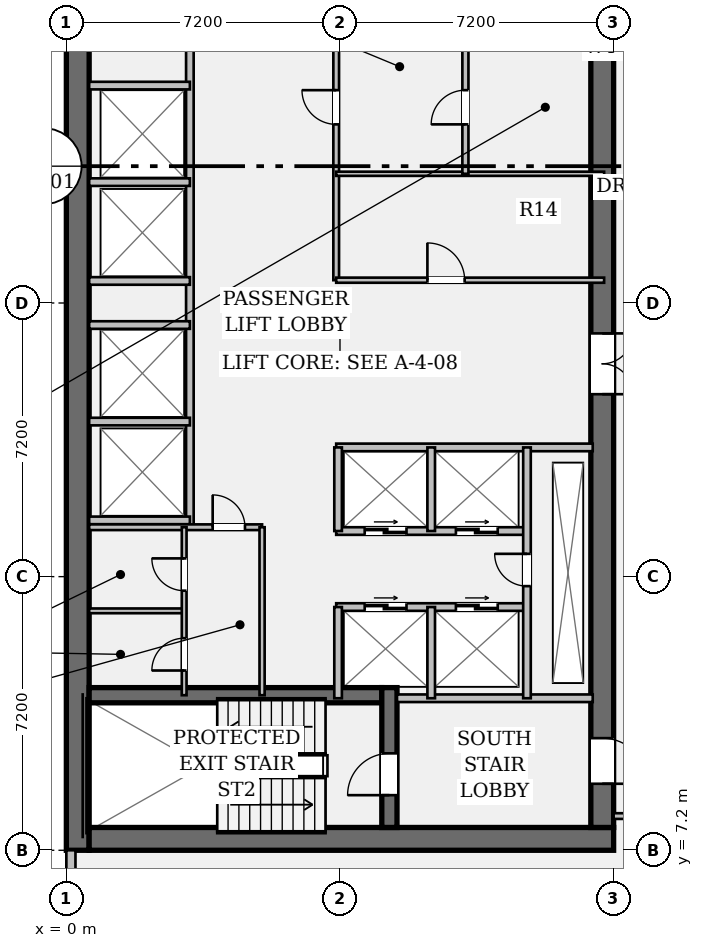
"""IFC4 building model, lengths in metres.
Left out: names, types, materials, properties, quantities, classifications, styles, units other than length and angle.
Written with IfcOpenShell. Run it as: python <this file> out.ifc"""

import sys

from ifc_helpers import new_model, si_unit, direction, frame, frame_2d, origin, place, context, subcontext, project, spatial, rectangle, extrude, element, fill, save


model = new_model("IFC4")
c1 = context("Model", 3, precision=1e-05, world=origin(), true_north=direction((0.0, 1.0)))
c2 = subcontext(c1, "Body", "Model", "MODEL_VIEW")
j1 = project(units=[si_unit("LENGTHUNIT", "METRE"), si_unit("PLANEANGLEUNIT", "RADIAN")], contexts=[c1])
p1 = place(None, origin())
s1 = spatial("IfcSite", under=j1, at=p1, CompositionType="ELEMENT")
p2 = place(p1, origin())
s2 = spatial("IfcBuilding", under=s1, at=p2, CompositionType="ELEMENT")
p3 = place(p2, frame((0.0, 0.0, 129.15)))
s3 = spatial("IfcBuildingStorey", under=s2, at=p3, CompositionType="ELEMENT", Elevation=129.15)
p4 = place(p3, frame((0.3, 7.2, 0.0), z_axis=(0.0, 0.0, 1.0), x_axis=(0.0, 1.0, 0.0)))
e1 = element("IfcWall", 1, at=p4, inside=s3, PredefinedType="SHEAR", context=c2, shape_type="SweptSolid", body=[
    extrude(rectangle(XDim=28.8, YDim=0.6, at=frame_2d((14.4, 0.0))), origin(), (0.0, 0.0, 1.0), 3.58),
])
p5 = place(p3, frame((0.6, 7.5, 0.0), z_axis=(0.0, 0.0, 1.0), x_axis=(1.0, 0.0, 0.0)))
e2 = element("IfcWall", 2, at=p5, inside=s3, PredefinedType="SHEAR", context=c2, shape_type="SweptSolid", body=[
    extrude(rectangle(XDim=13.8, YDim=0.6, at=frame_2d((6.9, 0.0))), origin(), (0.0, 0.0, 1.0), 3.58),
])
p6 = place(p3, frame((14.1, 35.4, 0.0), z_axis=(0.0, 0.0, 1.0), x_axis=(0.0, -1.0, 0.0)))
e3 = element("IfcWall", 3, at=p6, inside=s3, PredefinedType="SHEAR", context=c2, shape_type="SweptSolid", body=[
    extrude(rectangle(XDim=27.6, YDim=0.6, at=frame_2d((13.8, 0.0))), origin(), (0.0, 0.0, 1.0), 3.58),
])
p7 = place(p6, frame((1.3, 0.0, 0.0)))
e4 = element("IfcOpeningElement", 4, at=p7, cuts=e3, PredefinedType="OPENING", context=c2, shape_type="SweptSolid", body=[
    extrude(rectangle(XDim=1.2, YDim=2.15, at=frame_2d((0.6, 1.075))), frame((0.0, 0.312, 0.0), z_axis=(0.0, -1.0, 0.0), x_axis=(1.0, 0.0, 0.0)), (0.0, 0.0, 1.0), 0.624),
])
p8 = place(p6, frame((25.25, 0.0, 0.0)))
e5 = element("IfcOpeningElement", 5, at=p8, cuts=e3, PredefinedType="OPENING", context=c2, shape_type="SweptSolid", body=[
    extrude(rectangle(XDim=1.2, YDim=2.15, at=frame_2d((0.6, 1.075))), frame((0.0, 0.312, 0.0), z_axis=(0.0, -1.0, 0.0), x_axis=(1.0, 0.0, 0.0)), (0.0, 0.0, 1.0), 0.624),
])
p9 = place(p6, frame((14.6, 0.0, 0.0)))
e6 = element("IfcOpeningElement", 6, at=p9, cuts=e3, PredefinedType="OPENING", context=c2, shape_type="SweptSolid", body=[
    extrude(rectangle(XDim=1.6, YDim=2.2, at=frame_2d((0.8, 1.1))), frame((0.0, 0.312, 0.0), z_axis=(0.0, -1.0, 0.0), x_axis=(1.0, 0.0, 0.0)), (0.0, 0.0, 1.0), 0.624),
])
p10 = place(p3, frame((0.6, 11.28, 0.0), z_axis=(0.0, 0.0, 1.0), x_axis=(1.0, 0.0, 0.0)))
e7 = element("IfcWall", 7, at=p10, inside=s3, PredefinedType="SHEAR", context=c2, shape_type="SweptSolid", body=[
    extrude(rectangle(XDim=7.7, YDim=0.4, at=frame_2d((3.85, 0.0))), origin(), (0.0, 0.0, 1.0), 3.58),
])
p11 = place(p3, frame((8.5, 7.8, 0.0), z_axis=(0.0, 0.0, 1.0), x_axis=(0.0, 1.0, 0.0)))
e8 = element("IfcWall", 8, at=p11, inside=s3, PredefinedType="SHEAR", context=c2, shape_type="SweptSolid", body=[
    extrude(rectangle(XDim=3.68, YDim=0.4, at=frame_2d((1.84, 0.0))), origin(), (0.0, 0.0, 1.0), 3.58),
])
p12 = place(p11, frame((0.85, 0.0, 0.0)))
e9 = element("IfcOpeningElement", 9, at=p12, cuts=e8, PredefinedType="OPENING", context=c2, shape_type="SweptSolid", body=[
    extrude(rectangle(XDim=1.1, YDim=2.15, at=frame_2d((0.55, 1.075))), frame((0.0, 0.212, 0.0), z_axis=(0.0, -1.0, 0.0), x_axis=(1.0, 0.0, 0.0)), (0.0, 0.0, 1.0), 0.424),
])
p13 = place(p3, frame((0.12, 5.87, 0.0), z_axis=(0.0, 0.0, 1.0), x_axis=(0.0, 1.0, 0.0)))
e10 = element("IfcWall", 10, at=p13, inside=s3, PredefinedType="STANDARD", context=c2, shape_type="SweptSolid", body=[
    extrude(rectangle(XDim=1.33, YDim=0.24, at=frame_2d((0.665, 0.0))), origin(), (0.0, 0.0, 1.0), 3.58),
])
p14 = place(p3, frame((8.7, 11.2, 0.0), z_axis=(0.0, 0.0, 1.0), x_axis=(1.0, 0.0, 0.0)))
e11 = element("IfcWall", 11, at=p14, inside=s3, PredefinedType="PARTITIONING", context=c2, shape_type="SweptSolid", body=[
    extrude(rectangle(XDim=5.15, YDim=0.2, at=frame_2d((2.575, 0.0))), origin(), (0.0, 0.0, 1.0), 3.58),
])
p15 = place(p3, frame((3.25, 15.7, 0.0), z_axis=(0.0, 0.0, 1.0), x_axis=(0.0, 1.0, 0.0)))
e12 = element("IfcWall", 12, at=p15, inside=s3, PredefinedType="PARTITIONING", context=c2, shape_type="SweptSolid", body=[
    extrude(rectangle(XDim=13.08, YDim=0.2, at=frame_2d((6.54, 0.0))), origin(), (0.0, 0.0, 1.0), 3.58),
])
for number, where, z_axis, x_axis in (
    (13, (0.6, 15.88, 0.0), (0.0, 0.0, 1.0), (1.0, 0.0, 0.0)),
    (14, (0.6, 18.48, 0.0), (0.0, 0.0, 1.0), (1.0, 0.0, 0.0)),
    (15, (0.6, 22.18, 0.0), (0.0, 0.0, 1.0), (1.0, 0.0, 0.0)),
    (16, (0.6, 24.78, 0.0), (0.0, 0.0, 1.0), (1.0, 0.0, 0.0)),
    (17, (0.6, 21.02, 0.0), (0.0, 0.0, 1.0), (1.0, 0.0, 0.0)),
    (18, (0.6, 27.32, 0.0), (0.0, 0.0, 1.0), (1.0, 0.0, 0.0)),
):
    element("IfcWall", number, at=place(p3, frame(where, z_axis=z_axis, x_axis=x_axis)), inside=s3, PredefinedType="PARTITIONING", context=c2, shape_type="SweptSolid", body=[
        extrude(rectangle(XDim=2.65, YDim=0.2, at=frame_2d((1.325, 0.0))), origin(), (0.0, 0.0, 1.0), 3.58),
    ])
p16 = place(p3, frame((7.1, 22.2, 0.0), z_axis=(0.0, 0.0, 1.0), x_axis=(0.0, 1.0, 0.0)))
e19 = element("IfcWall", 19, at=p16, inside=s3, PredefinedType="PARTITIONING", context=c2, shape_type="SweptSolid", body=[
    extrude(rectangle(XDim=6.58, YDim=0.15, at=frame_2d((3.29, 0.0))), origin(), (0.0, 0.0, 1.0), 3.58),
])
p17 = place(p16, frame((4.1, 0.0, 0.0)))
e20 = element("IfcOpeningElement", 20, at=p17, cuts=e19, PredefinedType="OPENING", context=c2, shape_type="SweptSolid", body=[
    extrude(rectangle(XDim=0.9, YDim=2.15, at=frame_2d((0.45, 1.075))), frame((0.0, 0.087, 0.0), z_axis=(0.0, -1.0, 0.0), x_axis=(1.0, 0.0, 0.0)), (0.0, 0.0, 1.0), 0.174),
])
p18 = place(p3, frame((7.1, 22.2, 0.0), z_axis=(0.0, 0.0, 1.0), x_axis=(1.0, 0.0, 0.0)))
e21 = element("IfcWall", 21, at=p18, inside=s3, PredefinedType="PARTITIONING", context=c2, shape_type="SweptSolid", body=[
    extrude(rectangle(XDim=7.05, YDim=0.135, at=frame_2d((3.525, 0.0))), origin(), (0.0, 0.0, 1.0), 3.58),
])
p19 = place(p18, frame((2.4, 0.0, 0.0)))
e22 = element("IfcOpeningElement", 22, at=p19, cuts=e21, PredefinedType="OPENING", context=c2, shape_type="SweptSolid", body=[
    extrude(rectangle(XDim=0.98, YDim=2.15, at=frame_2d((0.49, 1.075))), frame((0.0, 0.08, 0.0), z_axis=(0.0, -1.0, 0.0), x_axis=(1.0, 0.0, 0.0)), (0.0, 0.0, 1.0), 0.159),
])
p20 = place(p3, frame((7.1, 25.0, 0.0), z_axis=(0.0, 0.0, 1.0), x_axis=(1.0, 0.0, 0.0)))
e23 = element("IfcWall", 23, at=p20, inside=s3, PredefinedType="PARTITIONING", context=c2, shape_type="SweptSolid", body=[
    extrude(rectangle(XDim=7.05, YDim=0.11, at=frame_2d((3.525, 0.0))), origin(), (0.0, 0.0, 1.0), 3.58),
])
p21 = place(p3, frame((10.5, 25.0, 0.0), z_axis=(0.0, 0.0, 1.0), x_axis=(0.0, 1.0, 0.0)))
e24 = element("IfcWall", 24, at=p21, inside=s3, PredefinedType="PARTITIONING", context=c2, shape_type="SweptSolid", body=[
    extrude(rectangle(XDim=3.78, YDim=0.16, at=frame_2d((1.89, 0.0))), origin(), (0.0, 0.0, 1.0), 3.58),
])
p22 = place(p21, frame((1.3, 0.0, 0.0)))
e25 = element("IfcOpeningElement", 25, at=p22, cuts=e24, PredefinedType="OPENING", context=c2, shape_type="SweptSolid", body=[
    extrude(rectangle(XDim=0.9, YDim=2.15, at=frame_2d((0.45, 1.075))), frame((0.0, 0.092, 0.0), z_axis=(0.0, -1.0, 0.0), x_axis=(1.0, 0.0, 0.0)), (0.0, 0.0, 1.0), 0.184),
])
p23 = place(p3, frame((7.1, 17.8, 0.0), z_axis=(0.0, 0.0, 1.0), x_axis=(1.0, 0.0, 0.0)))
e26 = element("IfcWall", 26, at=p23, inside=s3, PredefinedType="PARTITIONING", context=c2, shape_type="SweptSolid", body=[
    extrude(rectangle(XDim=6.75, YDim=0.2, at=frame_2d((3.375, 0.0))), origin(), (0.0, 0.0, 1.0), 3.58),
])
p24 = place(p3, frame((7.1, 15.6, 0.0), z_axis=(0.0, 0.0, 1.0), x_axis=(1.0, 0.0, 0.0)))
e27 = element("IfcWall", 27, at=p24, inside=s3, PredefinedType="PARTITIONING", context=c2, shape_type="SweptSolid", body=[
    extrude(rectangle(XDim=5.02, YDim=0.2, at=frame_2d((2.51, 0.0))), origin(), (0.0, 0.0, 1.0), 3.58),
])
p25 = place(p24, frame((0.75, 0.0, 0.0)))
e28 = element("IfcOpeningElement", 28, at=p25, cuts=e27, PredefinedType="OPENING", context=c2, shape_type="SweptSolid", body=[
    extrude(rectangle(XDim=1.1, YDim=2.2, at=frame_2d((0.55, 1.1))), frame((0.0, 0.112, 0.0), z_axis=(0.0, -1.0, 0.0), x_axis=(1.0, 0.0, 0.0)), (0.0, 0.0, 1.0), 0.224),
])
p26 = place(p24, frame((3.15, 0.0, 0.0)))
e29 = element("IfcOpeningElement", 29, at=p26, cuts=e27, PredefinedType="OPENING", context=c2, shape_type="SweptSolid", body=[
    extrude(rectangle(XDim=1.1, YDim=2.2, at=frame_2d((0.55, 1.1))), frame((0.0, 0.112, 0.0), z_axis=(0.0, -1.0, 0.0), x_axis=(1.0, 0.0, 0.0)), (0.0, 0.0, 1.0), 0.224),
])
p27 = place(p3, frame((7.1, 13.6, 0.0), z_axis=(0.0, 0.0, 1.0), x_axis=(1.0, 0.0, 0.0)))
e30 = element("IfcWall", 30, at=p27, inside=s3, PredefinedType="PARTITIONING", context=c2, shape_type="SweptSolid", body=[
    extrude(rectangle(XDim=5.02, YDim=0.2, at=frame_2d((2.51, 0.0))), origin(), (0.0, 0.0, 1.0), 3.58),
])
p28 = place(p27, frame((0.75, 0.0, 0.0)))
e31 = element("IfcOpeningElement", 31, at=p28, cuts=e30, PredefinedType="OPENING", context=c2, shape_type="SweptSolid", body=[
    extrude(rectangle(XDim=1.1, YDim=2.2, at=frame_2d((0.55, 1.1))), frame((0.0, 0.112, 0.0), z_axis=(0.0, -1.0, 0.0), x_axis=(1.0, 0.0, 0.0)), (0.0, 0.0, 1.0), 0.224),
])
p29 = place(p27, frame((3.15, 0.0, 0.0)))
e32 = element("IfcOpeningElement", 32, at=p29, cuts=e30, PredefinedType="OPENING", context=c2, shape_type="SweptSolid", body=[
    extrude(rectangle(XDim=1.1, YDim=2.2, at=frame_2d((0.55, 1.1))), frame((0.0, 0.112, 0.0), z_axis=(0.0, -1.0, 0.0), x_axis=(1.0, 0.0, 0.0)), (0.0, 0.0, 1.0), 0.224),
])
p30 = place(p3, frame((7.15, 15.6, 0.0), z_axis=(0.0, 0.0, 1.0), x_axis=(0.0, 1.0, 0.0)))
e33 = element("IfcWall", 33, at=p30, inside=s3, PredefinedType="PARTITIONING", context=c2, shape_type="SweptSolid", body=[
    extrude(rectangle(XDim=2.2, YDim=0.2, at=frame_2d((1.1, 0.0))), origin(), (0.0, 0.0, 1.0), 3.58),
])
p31 = place(p3, frame((7.15, 11.2, 0.0), z_axis=(0.0, 0.0, 1.0), x_axis=(0.0, 1.0, 0.0)))
e34 = element("IfcWall", 34, at=p31, inside=s3, PredefinedType="PARTITIONING", context=c2, shape_type="SweptSolid", body=[
    extrude(rectangle(XDim=2.4, YDim=0.2, at=frame_2d((1.2, 0.0))), origin(), (0.0, 0.0, 1.0), 3.58),
])
p32 = place(p3, frame((9.6, 15.6, 0.0), z_axis=(0.0, 0.0, 1.0), x_axis=(0.0, 1.0, 0.0)))
e35 = element("IfcWall", 35, at=p32, inside=s3, PredefinedType="PARTITIONING", context=c2, shape_type="SweptSolid", body=[
    extrude(rectangle(XDim=2.2, YDim=0.2, at=frame_2d((1.1, 0.0))), origin(), (0.0, 0.0, 1.0), 3.58),
])
p33 = place(p3, frame((9.6, 11.2, 0.0), z_axis=(0.0, 0.0, 1.0), x_axis=(0.0, 1.0, 0.0)))
e36 = element("IfcWall", 36, at=p33, inside=s3, PredefinedType="PARTITIONING", context=c2, shape_type="SweptSolid", body=[
    extrude(rectangle(XDim=2.4, YDim=0.2, at=frame_2d((1.2, 0.0))), origin(), (0.0, 0.0, 1.0), 3.58),
])
p34 = place(p3, frame((12.12, 11.2, 0.0), z_axis=(0.0, 0.0, 1.0), x_axis=(0.0, 1.0, 0.0)))
e37 = element("IfcWall", 37, at=p34, inside=s3, PredefinedType="PARTITIONING", context=c2, shape_type="SweptSolid", body=[
    extrude(rectangle(XDim=6.6, YDim=0.2, at=frame_2d((3.3, 0.0))), origin(), (0.0, 0.0, 1.0), 3.58),
])
p35 = place(p34, frame((2.95, 0.0, 0.0)))
e38 = element("IfcOpeningElement", 38, at=p35, cuts=e37, PredefinedType="OPENING", context=c2, shape_type="SweptSolid", body=[
    extrude(rectangle(XDim=0.85, YDim=2.15, at=frame_2d((0.425, 1.075))), frame((0.0, 0.112, 0.0), z_axis=(0.0, -1.0, 0.0), x_axis=(1.0, 0.0, 0.0)), (0.0, 0.0, 1.0), 0.224),
])
p36 = place(p3, frame((0.6, 15.7, 0.0), z_axis=(0.0, 0.0, 1.0), x_axis=(1.0, 0.0, 0.0)))
e39 = element("IfcWall", 39, at=p36, inside=s3, PredefinedType="PARTITIONING", context=c2, shape_type="SweptSolid", body=[
    extrude(rectangle(XDim=4.55, YDim=0.15, at=frame_2d((2.275, 0.0))), origin(), (0.0, 0.0, 1.0), 3.58),
])
p37 = place(p36, frame((3.25, 0.0, 0.0)))
e40 = element("IfcOpeningElement", 40, at=p37, cuts=e39, PredefinedType="OPENING", context=c2, shape_type="SweptSolid", body=[
    extrude(rectangle(XDim=0.85, YDim=2.15, at=frame_2d((0.425, 1.075))), frame((0.0, 0.087, 0.0), z_axis=(0.0, -1.0, 0.0), x_axis=(1.0, 0.0, 0.0)), (0.0, 0.0, 1.0), 0.174),
])
p38 = place(p3, frame((5.15, 11.28, 0.0), z_axis=(0.0, 0.0, 1.0), x_axis=(0.0, 1.0, 0.0)))
e41 = element("IfcWall", 41, at=p38, inside=s3, PredefinedType="PARTITIONING", context=c2, shape_type="SweptSolid", body=[
    extrude(rectangle(XDim=4.42, YDim=0.135, at=frame_2d((2.21, 0.0))), origin(), (0.0, 0.0, 1.0), 3.58),
])
p39 = place(p3, frame((0.6, 13.5, 0.0), z_axis=(0.0, 0.0, 1.0), x_axis=(1.0, 0.0, 0.0)))
e42 = element("IfcWall", 42, at=p39, inside=s3, PredefinedType="PARTITIONING", context=c2, shape_type="SweptSolid", body=[
    extrude(rectangle(XDim=2.5, YDim=0.125, at=frame_2d((1.25, 0.0))), origin(), (0.0, 0.0, 1.0), 3.58),
])
p40 = place(p3, frame((3.1, 11.28, 0.0), z_axis=(0.0, 0.0, 1.0), x_axis=(0.0, 1.0, 0.0)))
e43 = element("IfcWall", 43, at=p40, inside=s3, PredefinedType="PARTITIONING", context=c2, shape_type="SweptSolid", body=[
    extrude(rectangle(XDim=4.42, YDim=0.125, at=frame_2d((2.21, 0.0))), origin(), (0.0, 0.0, 1.0), 3.58),
])
p41 = place(p40, frame((0.65, 0.0, 0.0)))
e44 = element("IfcOpeningElement", 44, at=p41, cuts=e43, PredefinedType="OPENING", context=c2, shape_type="SweptSolid", body=[
    extrude(rectangle(XDim=0.85, YDim=2.15, at=frame_2d((0.425, 1.075))), frame((0.0, 0.074, 0.0), z_axis=(0.0, -1.0, 0.0), x_axis=(1.0, 0.0, 0.0)), (0.0, 0.0, 1.0), 0.149),
])
p42 = place(p40, frame((2.75, 0.0, 0.0)))
e45 = element("IfcOpeningElement", 45, at=p42, cuts=e43, PredefinedType="OPENING", context=c2, shape_type="SweptSolid", body=[
    extrude(rectangle(XDim=0.85, YDim=2.15, at=frame_2d((0.425, 1.075))), frame((0.0, 0.074, 0.0), z_axis=(0.0, -1.0, 0.0), x_axis=(1.0, 0.0, 0.0)), (0.0, 0.0, 1.0), 0.149),
])
p43 = place(p3, frame((14.4, 8.1, 0.0), z_axis=(0.0, 0.0, 1.0), x_axis=(1.0, 0.0, 0.0)))
e46 = element("IfcWall", 46, at=p43, inside=s3, PredefinedType="PARTITIONING", context=c2, shape_type="SweptSolid", body=[
    extrude(rectangle(XDim=2.95, YDim=0.15, at=frame_2d((1.475, 0.0))), origin(), (0.0, 0.0, 1.0), 3.148),
])
p44 = place(p43, frame((0.95, 0.0, 0.0)))
e47 = element("IfcOpeningElement", 47, at=p44, cuts=e46, PredefinedType="OPENING", context=c2, shape_type="SweptSolid", body=[
    extrude(rectangle(XDim=0.98, YDim=2.15, at=frame_2d((0.49, 1.075))), frame((0.0, 0.087, 0.0), z_axis=(0.0, -1.0, 0.0), x_axis=(1.0, 0.0, 0.0)), (0.0, 0.0, 1.0), 0.174),
])
p45 = place(p12, origin())
e48 = element("IfcDoor", 48, at=p45, inside=s3, OperationType="SINGLE_SWING_LEFT", PredefinedType="DOOR", context=c2, shape_type="SweptSolid", body=[
    extrude(rectangle(XDim=1.1, YDim=2.15, at=frame_2d((0.55, 1.075))), frame((0.0, 0.025, 0.0), z_axis=(0.0, -1.0, 0.0), x_axis=(1.0, 0.0, 0.0)), (0.0, 0.0, 1.0), 0.05),
])
fill(e9, e48)
p46 = place(p8, origin())
e49 = element("IfcDoor", 49, at=p46, inside=s3, OperationType="SINGLE_SWING_RIGHT", PredefinedType="DOOR", context=c2, shape_type="SweptSolid", body=[
    extrude(rectangle(XDim=1.2, YDim=2.15, at=frame_2d((0.6, 1.075))), frame((0.0, 0.025, 0.0), z_axis=(0.0, -1.0, 0.0), x_axis=(1.0, 0.0, 0.0)), (0.0, 0.0, 1.0), 0.05),
])
fill(e5, e49)
p47 = place(p9, origin())
e50 = element("IfcDoor", 50, at=p47, inside=s3, OperationType="DOUBLE_DOOR_SINGLE_SWING", PredefinedType="DOOR", context=c2, shape_type="SweptSolid", body=[
    extrude(rectangle(XDim=1.6, YDim=2.2, at=frame_2d((0.8, 1.1))), frame((0.0, 0.025, 0.0), z_axis=(0.0, -1.0, 0.0), x_axis=(1.0, 0.0, 0.0)), (0.0, 0.0, 1.0), 0.05),
])
fill(e6, e50)
p48 = place(p19, origin())
e51 = element("IfcDoor", 51, at=p48, inside=s3, OperationType="SINGLE_SWING_LEFT", PredefinedType="DOOR", context=c2, shape_type="SweptSolid", body=[
    extrude(rectangle(XDim=0.98, YDim=2.15, at=frame_2d((0.49, 1.075))), frame((0.0, 0.025, 0.0), z_axis=(0.0, -1.0, 0.0), x_axis=(1.0, 0.0, 0.0)), (0.0, 0.0, 1.0), 0.05),
])
fill(e22, e51)
p49 = place(p17, origin())
e52 = element("IfcDoor", 52, at=p49, inside=s3, OperationType="SINGLE_SWING_RIGHT", PredefinedType="DOOR", context=c2, shape_type="SweptSolid", body=[
    extrude(rectangle(XDim=0.9, YDim=2.15, at=frame_2d((0.45, 1.075))), frame((0.0, 0.025, 0.0), z_axis=(0.0, -1.0, 0.0), x_axis=(1.0, 0.0, 0.0)), (0.0, 0.0, 1.0), 0.05),
])
fill(e20, e52)
p50 = place(p22, origin())
e53 = element("IfcDoor", 53, at=p50, inside=s3, OperationType="SINGLE_SWING_LEFT", PredefinedType="DOOR", context=c2, shape_type="SweptSolid", body=[
    extrude(rectangle(XDim=0.9, YDim=2.15, at=frame_2d((0.45, 1.075))), frame((0.0, 0.025, 0.0), z_axis=(0.0, -1.0, 0.0), x_axis=(1.0, 0.0, 0.0)), (0.0, 0.0, 1.0), 0.05),
])
fill(e25, e53)
p51 = place(p35, origin())
e54 = element("IfcDoor", 54, at=p51, inside=s3, OperationType="SINGLE_SWING_RIGHT", PredefinedType="DOOR", context=c2, shape_type="SweptSolid", body=[
    extrude(rectangle(XDim=0.85, YDim=2.15, at=frame_2d((0.425, 1.075))), frame((0.0, 0.025, 0.0), z_axis=(0.0, -1.0, 0.0), x_axis=(1.0, 0.0, 0.0)), (0.0, 0.0, 1.0), 0.05),
])
fill(e38, e54)
p52 = place(p25, origin())
e55 = element("IfcDoor", 55, at=p52, inside=s3, OperationType="DOUBLE_DOOR_SLIDING", PredefinedType="DOOR", context=c2, shape_type="SweptSolid", body=[
    extrude(rectangle(XDim=1.1, YDim=2.2, at=frame_2d((0.55, 1.1))), frame((0.0, 0.025, 0.0), z_axis=(0.0, -1.0, 0.0), x_axis=(1.0, 0.0, 0.0)), (0.0, 0.0, 1.0), 0.05),
])
fill(e28, e55)
p53 = place(p26, origin())
e56 = element("IfcDoor", 56, at=p53, inside=s3, OperationType="DOUBLE_DOOR_SLIDING", PredefinedType="DOOR", context=c2, shape_type="SweptSolid", body=[
    extrude(rectangle(XDim=1.1, YDim=2.2, at=frame_2d((0.55, 1.1))), frame((0.0, 0.025, 0.0), z_axis=(0.0, -1.0, 0.0), x_axis=(1.0, 0.0, 0.0)), (0.0, 0.0, 1.0), 0.05),
])
fill(e29, e56)
p54 = place(p28, origin())
e57 = element("IfcDoor", 57, at=p54, inside=s3, OperationType="DOUBLE_DOOR_SLIDING", PredefinedType="DOOR", context=c2, shape_type="SweptSolid", body=[
    extrude(rectangle(XDim=1.1, YDim=2.2, at=frame_2d((0.55, 1.1))), frame((0.0, 0.025, 0.0), z_axis=(0.0, -1.0, 0.0), x_axis=(1.0, 0.0, 0.0)), (0.0, 0.0, 1.0), 0.05),
])
fill(e31, e57)
p55 = place(p29, origin())
e58 = element("IfcDoor", 58, at=p55, inside=s3, OperationType="DOUBLE_DOOR_SLIDING", PredefinedType="DOOR", context=c2, shape_type="SweptSolid", body=[
    extrude(rectangle(XDim=1.1, YDim=2.2, at=frame_2d((0.55, 1.1))), frame((0.0, 0.025, 0.0), z_axis=(0.0, -1.0, 0.0), x_axis=(1.0, 0.0, 0.0)), (0.0, 0.0, 1.0), 0.05),
])
fill(e32, e58)
p56 = place(p37, origin())
e59 = element("IfcDoor", 59, at=p56, inside=s3, OperationType="SINGLE_SWING_LEFT", PredefinedType="DOOR", context=c2, shape_type="SweptSolid", body=[
    extrude(rectangle(XDim=0.85, YDim=2.15, at=frame_2d((0.425, 1.075))), frame((0.0, 0.025, 0.0), z_axis=(0.0, -1.0, 0.0), x_axis=(1.0, 0.0, 0.0)), (0.0, 0.0, 1.0), 0.05),
])
fill(e40, e59)
p57 = place(p41, origin())
e60 = element("IfcDoor", 60, at=p57, inside=s3, OperationType="SINGLE_SWING_LEFT", PredefinedType="DOOR", context=c2, shape_type="SweptSolid", body=[
    extrude(rectangle(XDim=0.85, YDim=2.15, at=frame_2d((0.425, 1.075))), frame((0.0, 0.025, 0.0), z_axis=(0.0, -1.0, 0.0), x_axis=(1.0, 0.0, 0.0)), (0.0, 0.0, 1.0), 0.05),
])
fill(e44, e60)
p58 = place(p42, origin())
e61 = element("IfcDoor", 61, at=p58, inside=s3, OperationType="SINGLE_SWING_RIGHT", PredefinedType="DOOR", context=c2, shape_type="SweptSolid", body=[
    extrude(rectangle(XDim=0.85, YDim=2.15, at=frame_2d((0.425, 1.075))), frame((0.0, 0.025, 0.0), z_axis=(0.0, -1.0, 0.0), x_axis=(1.0, 0.0, 0.0)), (0.0, 0.0, 1.0), 0.05),
])
fill(e45, e61)
save(model, sys.argv[1])
